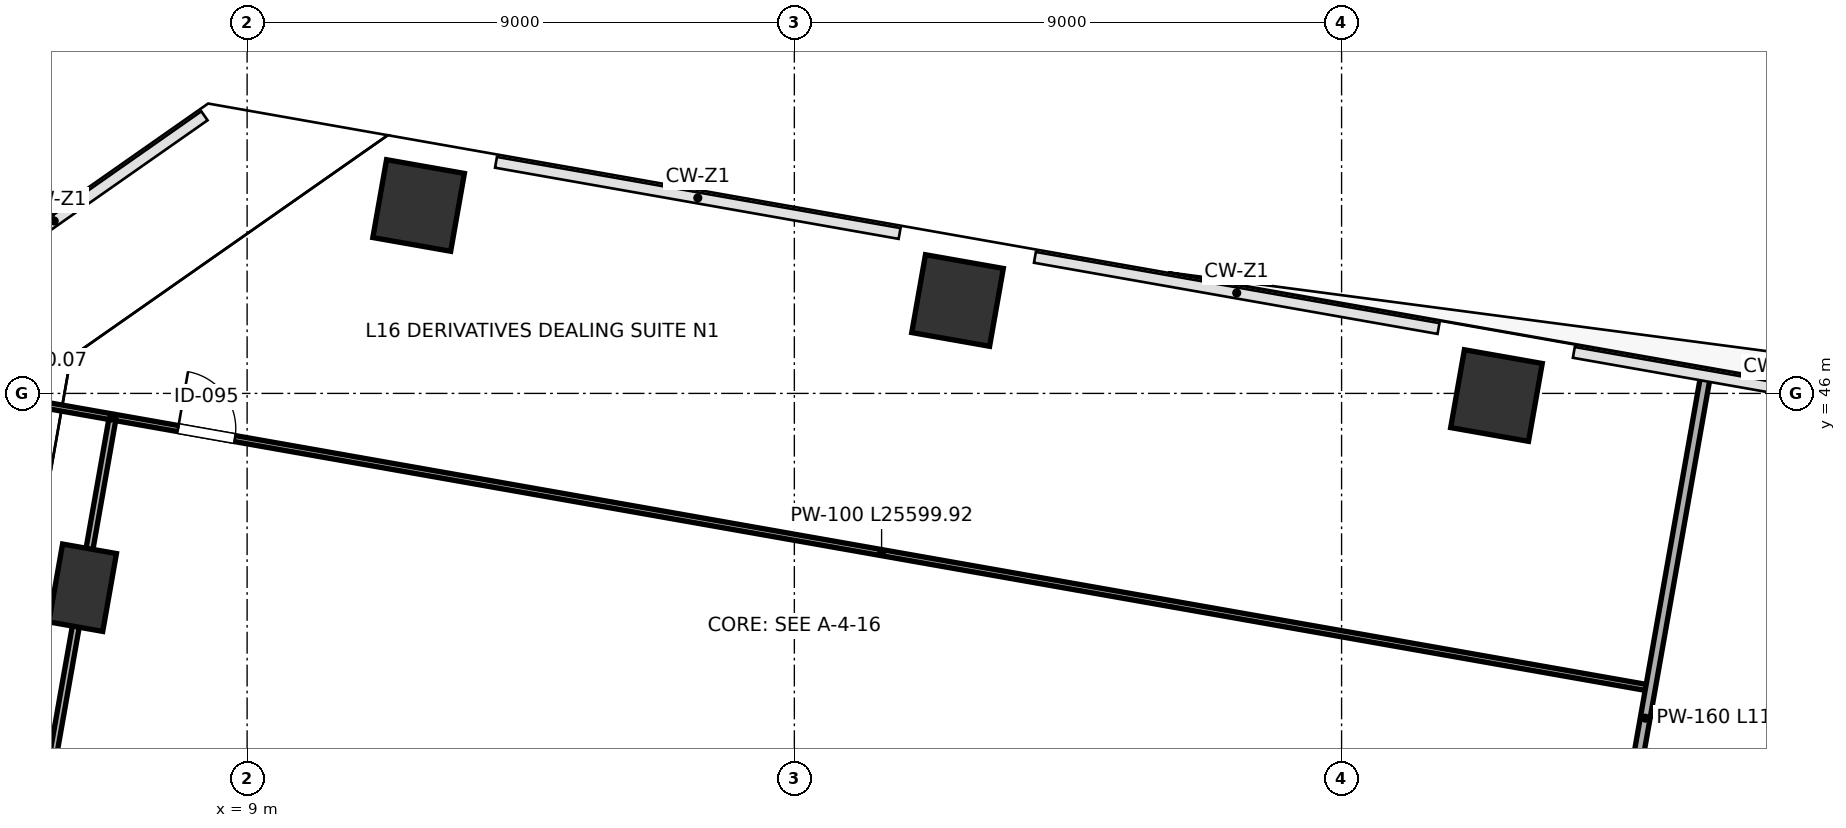
"""IFC4 building model, lengths in metres.
Left out: names, types, materials, properties, quantities, classifications, styles, units other than length and angle.
Written with IfcOpenShell. Run it as: python <this file> out.ifc"""

import sys

from ifc_helpers import new_model, si_unit, direction, frame, frame_2d, origin, origin_2d, place, context, subcontext, project, spatial, rectangle, extrude, source, transform, mapped, element, fill, save


model = new_model("IFC4")
c1 = context("Model", 3, precision=1e-05, world=origin(), true_north=direction((0.0, 1.0)))
c2 = subcontext(c1, "Body", "Model", "MODEL_VIEW")
j1 = project(units=[si_unit("LENGTHUNIT", "METRE"), si_unit("PLANEANGLEUNIT", "RADIAN")], contexts=[c1])
p1 = place(None, origin())
s1 = spatial("IfcSite", under=j1, at=p1, CompositionType="ELEMENT")
p2 = place(p1, origin())
s2 = spatial("IfcBuilding", under=s1, at=p2, CompositionType="ELEMENT")
p3 = place(p2, frame((0.0, 0.0, 74.8)))
s3 = spatial("IfcBuildingStorey", under=s2, at=p3, CompositionType="ELEMENT", Elevation=74.8)
m1 = source(origin(), c2, "Body", "SweptSolid", [
    extrude(rectangle(XDim=1.3, YDim=1.3, at=origin_2d()), origin(), (0.0, 0.0, 1.0), 4.198),
])
for number, where, z_axis, x_axis in (
    (1, (11.821, 49.09, 0.001), (0.0, 0.0, 1.0), (-0.985, 0.174, 0.0)),
    (2, (20.684, 47.528, 0.001), (0.0, 0.0, 1.0), (-0.985, 0.174, 0.0)),
    (3, (29.547, 45.965, 0.001), (0.0, 0.0, 1.0), (-0.985, 0.174, 0.0)),
):
    element("IfcColumn", number, at=place(p3, frame(where, z_axis=z_axis, x_axis=x_axis)), inside=s3, PredefinedType="COLUMN", context=c2, shape_type="MappedRepresentation", body=[
        mapped(m1, transform((0.0, 0.0, 0.0), scale=1.0)),
    ])
m2 = source(origin(), c2, "Body", "SweptSolid", [
    extrude(rectangle(XDim=0.9, YDim=1.3, at=origin_2d()), origin(), (0.0, 0.0, 1.0), 4.198),
])
p4 = place(p3, frame((6.295, 42.804, 0.001), z_axis=(0.0, 0.0, 1.0), x_axis=(-0.984807753012, 0.173648177667, 0.0)))
e4 = element("IfcColumn", 4, at=p4, inside=s3, PredefinedType="PILASTER", context=c2, shape_type="MappedRepresentation", body=[
    mapped(m2, transform((0.0, 0.0, 0.0), scale=1.0)),
])
p5 = place(p3, frame((6.83, 45.604, 0.0), z_axis=(0.0, 0.0, 1.0), x_axis=(0.984806496121, -0.173655305701, 0.0)))
e5 = element("IfcWall", 5, at=p5, inside=s3, PredefinedType="PARTITIONING", context=c2, shape_type="SweptSolid", body=[
    extrude(rectangle(XDim=25.6, YDim=0.1, at=frame_2d((12.8, 0.0))), origin(), (0.0, 0.0, 1.0), 3.96),
])
p6 = place(p5, frame((1.05, 0.0, 0.0)))
e6 = element("IfcOpeningElement", 6, at=p6, cuts=e5, PredefinedType="OPENING", context=c2, shape_type="SweptSolid", body=[
    extrude(rectangle(XDim=0.95, YDim=2.15, at=frame_2d((0.475, 1.075))), frame((0.0, 0.06, 0.0), z_axis=(0.0, -1.0, 0.0), x_axis=(1.0, 0.0, 0.0)), (0.0, 0.0, 1.0), 0.12),
])
p7 = place(p3, frame((2.607, 21.887, 0.0), z_axis=(0.0, 0.0, 1.0), x_axis=(0.173659666579, 0.984805727138, 0.0)))
e7 = element("IfcWall", 7, at=p7, inside=s3, PredefinedType="PARTITIONING", context=c2, shape_type="SweptSolid", body=[
    extrude(rectangle(XDim=24.05, YDim=0.115, at=frame_2d((12.025, 0.0))), origin(), (0.0, 0.0, 1.0), 2.795),
])
p8 = place(p7, frame((2.2, 0.0, 0.0)))
e8 = element("IfcOpeningElement", 8, at=p8, cuts=e7, PredefinedType="OPENING", context=c2, shape_type="SweptSolid", body=[
    extrude(rectangle(XDim=0.95, YDim=2.15, at=frame_2d((0.475, 1.075))), frame((0.0, 0.067, 0.0), z_axis=(0.0, -1.0, 0.0), x_axis=(1.0, 0.0, 0.0)), (0.0, 0.0, 1.0), 0.135),
])
p9 = place(p3, frame((3.176, 46.249, 0.0), z_axis=(0.0, 0.0, 1.0), x_axis=(0.984795743306, -0.173716274326, 0.0)))
e9 = element("IfcWall", 9, at=p9, inside=s3, PredefinedType="PARTITIONING", context=c2, shape_type="SweptSolid", body=[
    extrude(rectangle(XDim=3.63, YDim=0.1, at=frame_2d((1.815, 0.0))), origin(), (0.0, 0.0, 1.0), 3.96),
])
p10 = place(p3, frame((31.009, 35.076, 0.0), z_axis=(0.0, 0.0, 1.0), x_axis=(0.173653918008, 0.984806740818, 0.0)))
e10 = element("IfcWall", 10, at=p10, inside=s3, PredefinedType="PARTITIONING", context=c2, shape_type="SweptSolid", body=[
    extrude(rectangle(XDim=11.34, YDim=0.16, at=frame_2d((5.67, 0.0))), origin(), (0.0, 0.0, 1.0), 3.095),
])
m3 = source(origin(), c2, "Body", "SweptSolid", [
    extrude(rectangle(XDim=0.95, YDim=2.15, at=frame_2d((0.475, 1.075))), frame((0.0, 0.025, 0.0), z_axis=(0.0, -1.0, 0.0), x_axis=(1.0, 0.0, 0.0)), (0.0, 0.0, 1.0), 0.05),
])
p11 = place(p6, origin())
e11 = element("IfcDoor", 11, at=p11, inside=s3, OperationType="SINGLE_SWING_LEFT", PredefinedType="DOOR", context=c2, shape_type="MappedRepresentation", body=[
    mapped(m3, transform((0.0, 0.0, 0.0), scale=1.0)),
])
fill(e6, e11)
save(model, sys.argv[1])
